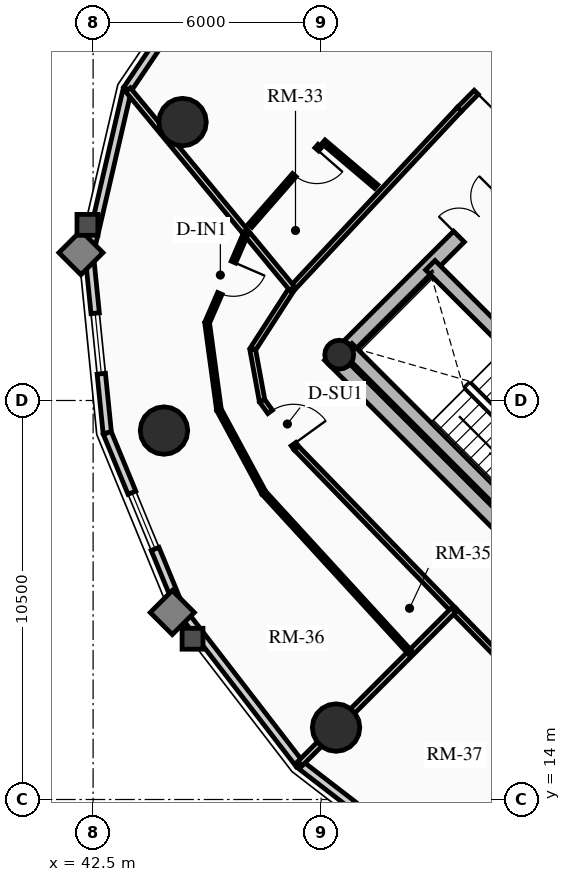
"""IFC4 building model, lengths in metres.
Left out: names, types, materials, properties, quantities, classifications, styles, units other than length and angle.
Written with IfcOpenShell. Run it as: python <this file> out.ifc"""

import sys

from ifc_helpers import new_model, si_unit, direction, frame, frame_2d, origin, origin_2d, place, context, subcontext, project, spatial, rectangle, circle, hollow_circle, extrude, source, transform, mapped, element, fill, save


model = new_model("IFC4")
c1 = context("Model", 3, precision=1e-05, world=origin(), true_north=direction((0.0, 1.0)))
c2 = subcontext(c1, "Body", "Model", "MODEL_VIEW")
j1 = project(units=[si_unit("LENGTHUNIT", "METRE"), si_unit("PLANEANGLEUNIT", "RADIAN")], contexts=[c1])
p1 = place(None, origin())
s1 = spatial("IfcSite", under=j1, at=p1, CompositionType="ELEMENT")
p2 = place(p1, origin())
s2 = spatial("IfcBuilding", under=s1, at=p2, CompositionType="ELEMENT")
p3 = place(p2, frame((0.0, 0.0, 177.79)))
s3 = spatial("IfcBuildingStorey", under=s2, at=p3, CompositionType="ELEMENT", Elevation=177.79)
p4 = place(p3, frame((58.702, 15.732, 0.0), z_axis=(0.0, 0.0, 1.0), x_axis=(-0.707106781187, 0.707106781187, 0.0)))
e1 = element("IfcWall", 1, at=p4, inside=s3, PredefinedType="SHEAR", context=c2, shape_type="SweptSolid", body=[
    extrude(rectangle(XDim=14.1, YDim=0.4, at=frame_2d((7.05, 0.0))), origin(), (0.0, 0.0, 1.0), 2.91),
])
p5 = place(p3, frame((48.873, 25.561, 0.0), z_axis=(0.0, 0.0, 1.0), x_axis=(0.707106781187, 0.707106781187, 0.0)))
e2 = element("IfcWall", 2, at=p5, inside=s3, PredefinedType="SHEAR", context=c2, shape_type="SweptSolid", body=[
    extrude(rectangle(XDim=10.7, YDim=0.4, at=frame_2d((5.35, 0.0))), origin(), (0.0, 0.0, 1.0), 2.91),
])
m1 = source(origin(), c2, "Body", "SweptSolid", [
    extrude(rectangle(XDim=1.5, YDim=2.02, at=frame_2d((0.75, 1.01))), frame((0.0, 0.21, 0.0), z_axis=(0.0, -1.0, 0.0), x_axis=(1.0, 0.0, 0.0)), (0.0, 0.0, 1.0), 0.42),
])
p6 = place(p5, frame((4.6, 0.0, 0.0)))
e3 = element("IfcOpeningElement", 3, at=p6, cuts=e2, PredefinedType="OPENING", context=c2, shape_type="MappedRepresentation", body=[
    mapped(m1, transform((0.0, 0.0, 0.0), x_axis=(1.0, 0.0, 0.0), y_axis=(0.0, 1.0, 0.0), z_axis=(0.0, 0.0, 1.0), scale=1.0)),
])
p7 = place(p3, frame((61.06, 18.373, 0.0), z_axis=(0.0, 0.0, 1.0), x_axis=(-0.707106781187, 0.707106781187, 0.0)))
e4 = element("IfcWall", 4, at=p7, inside=s3, PredefinedType="SHEAR", context=c2, shape_type="SweptSolid", body=[
    extrude(rectangle(XDim=13.7, YDim=0.35, at=frame_2d((6.85, 0.0))), origin(), (0.0, 0.0, 1.0), 2.91),
])
m2 = source(origin(), c2, "Body", "SweptSolid", [
    extrude(rectangle(XDim=1.1, YDim=2.015, at=frame_2d((0.55, 1.007))), frame((0.0, 0.185, 0.0), z_axis=(0.0, -1.0, 0.0), x_axis=(1.0, 0.0, 0.0)), (0.0, 0.0, 1.0), 0.37),
])
p8 = place(p7, frame((4.85, 0.0, 0.0)))
e5 = element("IfcOpeningElement", 5, at=p8, cuts=e4, PredefinedType="OPENING", context=c2, shape_type="MappedRepresentation", body=[
    mapped(m2, transform((0.0, 0.0, 0.0), x_axis=(1.0, 0.0, 0.0), y_axis=(0.0, 1.0, 0.0), z_axis=(0.0, 0.0, 1.0), scale=1.0)),
])
p9 = place(p7, frame((0.625, 0.0, 0.0)))
e6 = element("IfcOpeningElement", 6, at=p9, cuts=e4, PredefinedType="OPENING", context=c2, shape_type="MappedRepresentation", body=[
    mapped(m2, transform((0.0, 0.0, 0.0), x_axis=(1.0, 0.0, 0.0), y_axis=(0.0, 1.0, 0.0), z_axis=(0.0, 0.0, 1.0), scale=1.0)),
])
p10 = place(p7, frame((2.625, 0.0, 0.0)))
e7 = element("IfcOpeningElement", 7, at=p10, cuts=e4, PredefinedType="OPENING", context=c2, shape_type="MappedRepresentation", body=[
    mapped(m2, transform((0.0, 0.0, 0.0), x_axis=(1.0, 0.0, 0.0), y_axis=(0.0, 1.0, 0.0), z_axis=(0.0, 0.0, 1.0), scale=1.0)),
])
m3 = source(origin(), c2, "Body", "SweptSolid", [
    extrude(rectangle(XDim=1.15, YDim=2.02, at=frame_2d((0.575, 1.01))), frame((0.0, 0.185, 0.0), z_axis=(0.0, -1.0, 0.0), x_axis=(1.0, 0.0, 0.0)), (0.0, 0.0, 1.0), 0.37),
])
p11 = place(p7, frame((7.27, 0.0, 0.0)))
e8 = element("IfcOpeningElement", 8, at=p11, cuts=e4, PredefinedType="OPENING", context=c2, shape_type="MappedRepresentation", body=[
    mapped(m3, transform((0.0, 0.0, 0.0), x_axis=(1.0, 0.0, 0.0), y_axis=(0.0, 1.0, 0.0), z_axis=(0.0, 0.0, 1.0), scale=1.0)),
])
p12 = place(p3, frame((53.922, 21.141, 0.0), z_axis=(0.0, 0.0, 1.0), x_axis=(-0.707106781187, 0.707106781187, 0.0)))
e9 = element("IfcWall", 9, at=p12, inside=s3, PredefinedType="SHEAR", context=c2, shape_type="SweptSolid", body=[
    extrude(rectangle(XDim=6.695, YDim=0.35, at=frame_2d((3.348, 0.0))), origin(), (0.0, 0.0, 1.0), 2.91),
])
p13 = place(p3, frame((48.976, 25.706, 0.0), z_axis=(0.0, 0.0, 1.0), x_axis=(0.707106781187, 0.707106781187, 0.0)))
e10 = element("IfcColumn", 10, at=p13, inside=s3, PredefinedType="COLUMN", context=c2, shape_type="SweptSolid", body=[
    extrude(hollow_circle(Radius=0.38, WallThickness=0.032, at=origin_2d()), origin(), (0.0, 0.0, 1.0), 2.91),
])
for number, where, z_axis, x_axis in (
    (11, (44.854, 31.827, 0.0), (0.0, 0.0, 1.0), (1.0, 0.0, 0.0)),
    (12, (44.365, 23.709, 0.0), (0.0, 0.0, 1.0), (1.0, 0.0, 0.0)),
    (13, (48.893, 15.893, 0.0), (0.0, 0.0, 1.0), (1.0, 0.0, 0.0)),
):
    element("IfcColumn", number, at=place(p3, frame(where, z_axis=z_axis, x_axis=x_axis)), inside=s3, PredefinedType="USERDEFINED", context=c2, shape_type="SweptSolid", body=[
        extrude(circle(Radius=0.625, at=origin_2d()), origin(), (0.0, 0.0, 1.0), 2.91),
    ])
p14 = place(p3, frame((43.4, 32.687, 0.0), z_axis=(0.0, 0.0, 1.0), x_axis=(0.55951912514, 0.828817439852, 0.0)))
e14 = element("IfcWall", 14, at=p14, inside=s3, PredefinedType="SOLIDWALL", context=c2, shape_type="SweptSolid", body=[
    extrude(rectangle(XDim=4.259, YDim=0.22, at=frame_2d((2.129, 0.0))), origin(), (0.0, 0.0, 1.0), 2.245),
])
m4 = source(origin(), c2, "Body", "SweptSolid", [
    extrude(rectangle(XDim=1.6, YDim=1.3, at=frame_2d((0.8, 0.65))), frame((0.0, 0.12, 0.0), z_axis=(0.0, -1.0, 0.0), x_axis=(1.0, 0.0, 0.0)), (0.0, 0.0, 1.0), 0.24),
])
p15 = place(p14, frame((1.33, 0.0, 0.65)))
e15 = element("IfcOpeningElement", 15, at=p15, cuts=e14, PredefinedType="OPENING", context=c2, shape_type="MappedRepresentation", body=[
    mapped(m4, transform((0.0, 0.0, 0.0), x_axis=(1.0, 0.0, 0.0), y_axis=(0.0, 1.0, 0.0), z_axis=(0.0, 0.0, 1.0), scale=1.0)),
])
p16 = place(p3, frame((42.397, 28.355, 0.0), z_axis=(0.0, 0.0, 1.0), x_axis=(0.22557328587, 0.97422620202, 0.0)))
e16 = element("IfcWall", 16, at=p16, inside=s3, PredefinedType="SOLIDWALL", context=c2, shape_type="SweptSolid", body=[
    extrude(rectangle(XDim=4.446, YDim=0.22, at=frame_2d((2.223, 0.0))), origin(), (0.0, 0.0, 1.0), 2.245),
])
p17 = place(p3, frame((42.873, 23.646, 0.0), z_axis=(0.0, 0.0, 1.0), x_axis=(-0.100438356004, 0.994943283129, 0.0)))
e17 = element("IfcWall", 17, at=p17, inside=s3, PredefinedType="SOLIDWALL", context=c2, shape_type="SweptSolid", body=[
    extrude(rectangle(XDim=4.733, YDim=0.22, at=frame_2d((2.366, 0.0))), origin(), (0.0, 0.0, 1.0), 2.245),
])
p18 = place(p17, frame((1.566, 0.0, 0.65)))
e18 = element("IfcOpeningElement", 18, at=p18, cuts=e17, PredefinedType="OPENING", context=c2, shape_type="MappedRepresentation", body=[
    mapped(m4, transform((0.0, 0.0, 0.0), x_axis=(1.0, 0.0, 0.0), y_axis=(0.0, 1.0, 0.0), z_axis=(0.0, 0.0, 1.0), scale=1.0)),
])
p19 = place(p3, frame((44.78, 19.021, 0.0), z_axis=(0.0, 0.0, 1.0), x_axis=(-0.381196434348, 0.924494066201, 0.0)))
e19 = element("IfcWall", 19, at=p19, inside=s3, PredefinedType="SOLIDWALL", context=c2, shape_type="SweptSolid", body=[
    extrude(rectangle(XDim=5.003, YDim=0.22, at=frame_2d((2.501, 0.0))), origin(), (0.0, 0.0, 1.0), 2.245),
])
p20 = place(p19, frame((1.702, 0.0, 0.65)))
e20 = element("IfcOpeningElement", 20, at=p20, cuts=e19, PredefinedType="OPENING", context=c2, shape_type="MappedRepresentation", body=[
    mapped(m4, transform((0.0, 0.0, 0.0), x_axis=(1.0, 0.0, 0.0), y_axis=(0.0, 1.0, 0.0), z_axis=(0.0, 0.0, 1.0), scale=1.0)),
])
p21 = place(p3, frame((47.932, 14.932, 0.0), z_axis=(0.0, 0.0, 1.0), x_axis=(-0.610569654715, 0.791962560189, 0.0)))
e21 = element("IfcWall", 21, at=p21, inside=s3, PredefinedType="SOLIDWALL", context=c2, shape_type="SweptSolid", body=[
    extrude(rectangle(XDim=5.163, YDim=0.22, at=frame_2d((2.582, 0.0))), origin(), (0.0, 0.0, 1.0), 2.245),
])
p22 = place(p3, frame((52.021, 11.78, 0.0), z_axis=(0.0, 0.0, 1.0), x_axis=(-0.791962560189, 0.610569654715, 0.0)))
e22 = element("IfcWall", 22, at=p22, inside=s3, PredefinedType="SOLIDWALL", context=c2, shape_type="SweptSolid", body=[
    extrude(rectangle(XDim=5.163, YDim=0.22, at=frame_2d((2.582, 0.0))), origin(), (0.0, 0.0, 1.0), 2.245),
])
p23 = place(p22, frame((1.782, 0.0, 0.65)))
e23 = element("IfcOpeningElement", 23, at=p23, cuts=e22, PredefinedType="OPENING", context=c2, shape_type="MappedRepresentation", body=[
    mapped(m4, transform((0.0, 0.0, 0.0), x_axis=(1.0, 0.0, 0.0), y_axis=(0.0, 1.0, 0.0), z_axis=(0.0, 0.0, 1.0), scale=1.0)),
])
p24 = place(p3, frame((54.488, 34.535, 0.0), z_axis=(0.0, 0.0, 1.0), x_axis=(-0.703666289339, -0.710530613871, 0.0)))
e24 = element("IfcWall", 24, at=p24, inside=s3, PredefinedType="PARTITIONING", context=c2, shape_type="SweptSolid", body=[
    extrude(rectangle(XDim=3.343, YDim=0.15, at=frame_2d((1.672, 0.0))), origin(), (0.0, 0.0, 1.0), 2.245),
])
m5 = source(origin(), c2, "Body", "SweptSolid", [
    extrude(rectangle(XDim=1.05, YDim=2.015, at=frame_2d((0.525, 1.007))), frame((0.0, 0.085, 0.0), z_axis=(0.0, -1.0, 0.0), x_axis=(1.0, 0.0, 0.0)), (0.0, 0.0, 1.0), 0.17),
])
p25 = place(p24, frame((1.66, 0.0, 0.0)))
e25 = element("IfcOpeningElement", 25, at=p25, cuts=e24, PredefinedType="OPENING", context=c2, shape_type="MappedRepresentation", body=[
    mapped(m5, transform((0.0, 0.0, 0.0), x_axis=(1.0, 0.0, 0.0), y_axis=(0.0, 1.0, 0.0), z_axis=(0.0, 0.0, 1.0), scale=1.0)),
])
p26 = place(p3, frame((52.135, 32.159, 0.0), z_axis=(0.0, 0.0, 1.0), x_axis=(-0.682546302454, -0.730842353047, 0.0)))
e26 = element("IfcWall", 26, at=p26, inside=s3, PredefinedType="PARTITIONING", context=c2, shape_type="SweptSolid", body=[
    extrude(rectangle(XDim=6.445, YDim=0.15, at=frame_2d((3.223, 0.0))), origin(), (0.0, 0.0, 1.0), 2.245),
])
p27 = place(p3, frame((47.736, 27.449, 0.0), z_axis=(0.0, 0.0, 1.0), x_axis=(-0.542589259408, -0.839998152126, 0.0)))
e27 = element("IfcWall", 27, at=p27, inside=s3, PredefinedType="PARTITIONING", context=c2, shape_type="SweptSolid", body=[
    extrude(rectangle(XDim=1.912, YDim=0.15, at=frame_2d((0.956, 0.0))), origin(), (0.0, 0.0, 1.0), 2.245),
])
p28 = place(p3, frame((46.699, 25.843, 0.0), z_axis=(0.0, 0.0, 1.0), x_axis=(0.180451258011, -0.983583928032, 0.0)))
e28 = element("IfcWall", 28, at=p28, inside=s3, PredefinedType="PARTITIONING", context=c2, shape_type="SweptSolid", body=[
    extrude(rectangle(XDim=1.372, YDim=0.15, at=frame_2d((0.686, 0.0))), origin(), (0.0, 0.0, 1.0), 2.245),
])
p29 = place(p3, frame((46.946, 24.494, 0.0), z_axis=(0.0, 0.0, 1.0), x_axis=(0.586340262528, -0.810064871809, 0.0)))
e29 = element("IfcWall", 29, at=p29, inside=s3, PredefinedType="PARTITIONING", context=c2, shape_type="SweptSolid", body=[
    extrude(rectangle(XDim=1.531, YDim=0.15, at=frame_2d((0.766, 0.0))), origin(), (0.0, 0.0, 1.0), 2.245),
])
p30 = place(p29, frame((0.361, 0.0, 0.0)))
e30 = element("IfcOpeningElement", 30, at=p30, cuts=e29, PredefinedType="OPENING", context=c2, shape_type="MappedRepresentation", body=[
    mapped(m5, transform((0.0, 0.0, 0.0), x_axis=(1.0, 0.0, 0.0), y_axis=(0.0, 1.0, 0.0), z_axis=(0.0, 0.0, 1.0), scale=1.0)),
])
p31 = place(p3, frame((47.844, 23.253, 0.0), z_axis=(0.0, 0.0, 1.0), x_axis=(0.696248411352, -0.717800912293, 0.0)))
e31 = element("IfcWall", 31, at=p31, inside=s3, PredefinedType="PARTITIONING", context=c2, shape_type="SweptSolid", body=[
    extrude(rectangle(XDim=5.947, YDim=0.15, at=frame_2d((2.974, 0.0))), origin(), (0.0, 0.0, 1.0), 2.675),
])
p32 = place(p3, frame((51.985, 18.985, 0.0), z_axis=(0.0, 0.0, 1.0), x_axis=(0.699619654291, -0.714515457726, 0.0)))
e32 = element("IfcWall", 32, at=p32, inside=s3, PredefinedType="PARTITIONING", context=c2, shape_type="SweptSolid", body=[
    extrude(rectangle(XDim=6.064, YDim=0.15, at=frame_2d((3.032, 0.0))), origin(), (0.0, 0.0, 1.0), 2.245),
])
p33 = place(p3, frame((47.736, 27.449, 0.0), z_axis=(0.0, 0.0, 1.0), x_axis=(-0.636785609289, 0.771040911886, 0.0)))
e33 = element("IfcWall", 33, at=p33, inside=s3, PredefinedType="PARTITIONING", context=c2, shape_type="SweptSolid", body=[
    extrude(rectangle(XDim=6.781, YDim=0.16, at=frame_2d((3.391, 0.0))), origin(), (0.0, 0.0, 1.0), 2.245),
])
p34 = place(p3, frame((51.985, 18.985, 0.0), z_axis=(0.0, 0.0, 1.0), x_axis=(-0.707106781187, -0.707106781187, 0.0)))
e34 = element("IfcWall", 34, at=p34, inside=s3, PredefinedType="PARTITIONING", context=c2, shape_type="SweptSolid", body=[
    extrude(rectangle(XDim=5.711, YDim=0.16, at=frame_2d((2.855, 0.0))), origin(), (0.0, 0.0, 1.0), 2.245),
])
p35 = place(p3, frame((49.949, 30.13, 0.0), z_axis=(0.0, 0.0, 1.0), x_axis=(-0.76253118385, 0.646951461592, 0.0)))
e35 = element("IfcWall", 35, at=p35, inside=s3, PredefinedType="PARTITIONING", context=c2, shape_type="SweptSolid", body=[
    extrude(rectangle(XDim=1.821, YDim=0.125, at=frame_2d((0.91, 0.0))), origin(), (0.0, 0.0, 1.0), 2.675),
])
p36 = place(p3, frame((48.465, 31.199, 0.0), z_axis=(0.0, 0.0, 1.0), x_axis=(-0.658113718436, -0.752918543805, 0.0)))
e36 = element("IfcWall", 36, at=p36, inside=s3, PredefinedType="PARTITIONING", context=c2, shape_type="SweptSolid", body=[
    extrude(rectangle(XDim=2.786, YDim=0.125, at=frame_2d((1.393, 0.0))), origin(), (0.0, 0.0, 1.0), 2.245),
])
m6 = source(origin(), c2, "Body", "SweptSolid", [
    extrude(rectangle(XDim=0.9, YDim=2.005, at=frame_2d((0.45, 1.002))), frame((0.0, 0.073, 0.0), z_axis=(0.0, -1.0, 0.0), x_axis=(1.0, 0.0, 0.0)), (0.0, 0.0, 1.0), 0.145),
])
p37 = place(p36, frame((0.12, 0.0, 0.0)))
e37 = element("IfcOpeningElement", 37, at=p37, cuts=e36, PredefinedType="OPENING", context=c2, shape_type="MappedRepresentation", body=[
    mapped(m6, transform((0.0, 0.0, 0.0), x_axis=(1.0, 0.0, 0.0), y_axis=(0.0, 1.0, 0.0), z_axis=(0.0, 0.0, 1.0), scale=1.0)),
])
p38 = place(p3, frame((46.527, 28.913, 0.0), z_axis=(0.0, 0.0, 1.0), x_axis=(-0.398002989165, -0.917384118358, 0.0)))
e38 = element("IfcWall", 38, at=p38, inside=s3, PredefinedType="PARTITIONING", context=c2, shape_type="SweptSolid", body=[
    extrude(rectangle(XDim=2.581, YDim=0.125, at=frame_2d((1.29, 0.0))), origin(), (0.0, 0.0, 1.0), 2.245),
])
p39 = place(p38, frame((0.84, 0.0, 0.0)))
e39 = element("IfcOpeningElement", 39, at=p39, cuts=e38, PredefinedType="OPENING", context=c2, shape_type="MappedRepresentation", body=[
    mapped(m6, transform((0.0, 0.0, 0.0), x_axis=(1.0, 0.0, 0.0), y_axis=(0.0, 1.0, 0.0), z_axis=(0.0, 0.0, 1.0), scale=1.0)),
])
p40 = place(p3, frame((45.5, 26.546, 0.0), z_axis=(0.0, 0.0, 1.0), x_axis=(0.134877351861, -0.990862301208, 0.0)))
e40 = element("IfcWall", 40, at=p40, inside=s3, PredefinedType="PARTITIONING", context=c2, shape_type="SweptSolid", body=[
    extrude(rectangle(XDim=2.31, YDim=0.125, at=frame_2d((1.155, 0.0))), origin(), (0.0, 0.0, 1.0), 2.245),
])
p41 = place(p3, frame((45.811, 24.257, 0.0), z_axis=(0.0, 0.0, 1.0), x_axis=(0.474867364042, -0.880057376861, 0.0)))
e41 = element("IfcWall", 41, at=p41, inside=s3, PredefinedType="PARTITIONING", context=c2, shape_type="SweptSolid", body=[
    extrude(rectangle(XDim=2.484, YDim=0.125, at=frame_2d((1.242, 0.0))), origin(), (0.0, 0.0, 1.0), 2.245),
])
p42 = place(p3, frame((46.991, 22.071, 0.0), z_axis=(0.0, 0.0, 1.0), x_axis=(0.675455872419, -0.737400409828, 0.0)))
e42 = element("IfcWall", 42, at=p42, inside=s3, PredefinedType="PARTITIONING", context=c2, shape_type="SweptSolid", body=[
    extrude(rectangle(XDim=5.719, YDim=0.125, at=frame_2d((2.859, 0.0))), origin(), (0.0, 0.0, 1.0), 2.675),
])
m7 = source(origin(), c2, "Body", "SweptSolid", [
    extrude(rectangle(XDim=1.6, YDim=1.3, at=frame_2d((0.8, 0.65))), frame((0.0, 0.03, 0.0), z_axis=(0.0, -1.0, 0.0), x_axis=(1.0, 0.0, 0.0)), (0.0, 0.0, 1.0), 0.06),
])
p43 = place(p18, origin())
e43 = element("IfcWindow", 43, at=p43, inside=s3, PartitioningType="SINGLE_PANEL", PredefinedType="WINDOW", context=c2, shape_type="MappedRepresentation", body=[
    mapped(m7, transform((0.0, 0.0, 0.0), x_axis=(1.0, 0.0, 0.0), y_axis=(0.0, 1.0, 0.0), z_axis=(0.0, 0.0, 1.0), scale=1.0)),
])
fill(e18, e43)
p44 = place(p20, origin())
e44 = element("IfcWindow", 44, at=p44, inside=s3, PartitioningType="SINGLE_PANEL", PredefinedType="WINDOW", context=c2, shape_type="MappedRepresentation", body=[
    mapped(m7, transform((0.0, 0.0, 0.0), x_axis=(1.0, 0.0, 0.0), y_axis=(0.0, 1.0, 0.0), z_axis=(0.0, 0.0, 1.0), scale=1.0)),
])
fill(e20, e44)
m8 = source(origin(), c2, "Body", "SweptSolid", [
    extrude(rectangle(XDim=1.5, YDim=2.02, at=frame_2d((0.75, 1.01))), frame((0.0, 0.025, 0.0), z_axis=(0.0, -1.0, 0.0), x_axis=(1.0, 0.0, 0.0)), (0.0, 0.0, 1.0), 0.05),
])
p45 = place(p6, origin())
e45 = element("IfcDoor", 45, at=p45, inside=s3, OperationType="DOUBLE_DOOR_SINGLE_SWING", PredefinedType="DOOR", context=c2, shape_type="MappedRepresentation", body=[
    mapped(m8, transform((0.0, 0.0, 0.0), x_axis=(1.0, 0.0, 0.0), y_axis=(0.0, 1.0, 0.0), z_axis=(0.0, 0.0, 1.0), scale=1.0)),
])
fill(e3, e45)
m9 = source(origin(), c2, "Body", "SweptSolid", [
    extrude(rectangle(XDim=1.05, YDim=2.015, at=frame_2d((0.525, 1.007))), frame((0.0, 0.025, 0.0), z_axis=(0.0, -1.0, 0.0), x_axis=(1.0, 0.0, 0.0)), (0.0, 0.0, 1.0), 0.05),
])
p46 = place(p25, origin())
e46 = element("IfcDoor", 46, at=p46, inside=s3, OperationType="SINGLE_SWING_RIGHT", PredefinedType="DOOR", context=c2, shape_type="MappedRepresentation", body=[
    mapped(m9, transform((0.0, 0.0, 0.0), x_axis=(1.0, 0.0, 0.0), y_axis=(0.0, 1.0, 0.0), z_axis=(0.0, 0.0, 1.0), scale=1.0)),
])
fill(e25, e46)
m10 = source(origin(), c2, "Body", "SweptSolid", [
    extrude(rectangle(XDim=0.9, YDim=2.005, at=frame_2d((0.45, 1.002))), frame((0.0, 0.025, 0.0), z_axis=(0.0, -1.0, 0.0), x_axis=(1.0, 0.0, 0.0)), (0.0, 0.0, 1.0), 0.05),
])
p47 = place(p37, origin())
e47 = element("IfcDoor", 47, at=p47, inside=s3, OperationType="SINGLE_SWING_LEFT", PredefinedType="DOOR", context=c2, shape_type="MappedRepresentation", body=[
    mapped(m10, transform((0.0, 0.0, 0.0), x_axis=(1.0, 0.0, 0.0), y_axis=(0.0, 1.0, 0.0), z_axis=(0.0, 0.0, 1.0), scale=1.0)),
])
fill(e37, e47)
p48 = place(p30, origin())
e48 = element("IfcDoor", 48, at=p48, inside=s3, OperationType="SINGLE_SWING_RIGHT", PredefinedType="DOOR", context=c2, shape_type="MappedRepresentation", body=[
    mapped(m9, transform((0.0, 0.0, 0.0), x_axis=(1.0, 0.0, 0.0), y_axis=(0.0, 1.0, 0.0), z_axis=(0.0, 0.0, 1.0), scale=1.0)),
])
fill(e30, e48)
p49 = place(p39, origin())
e49 = element("IfcDoor", 49, at=p49, inside=s3, OperationType="SINGLE_SWING_LEFT", PredefinedType="DOOR", context=c2, shape_type="MappedRepresentation", body=[
    mapped(m10, transform((0.0, 0.0, 0.0), x_axis=(1.0, 0.0, 0.0), y_axis=(0.0, 1.0, 0.0), z_axis=(0.0, 0.0, 1.0), scale=1.0)),
])
fill(e39, e49)
save(model, sys.argv[1])
